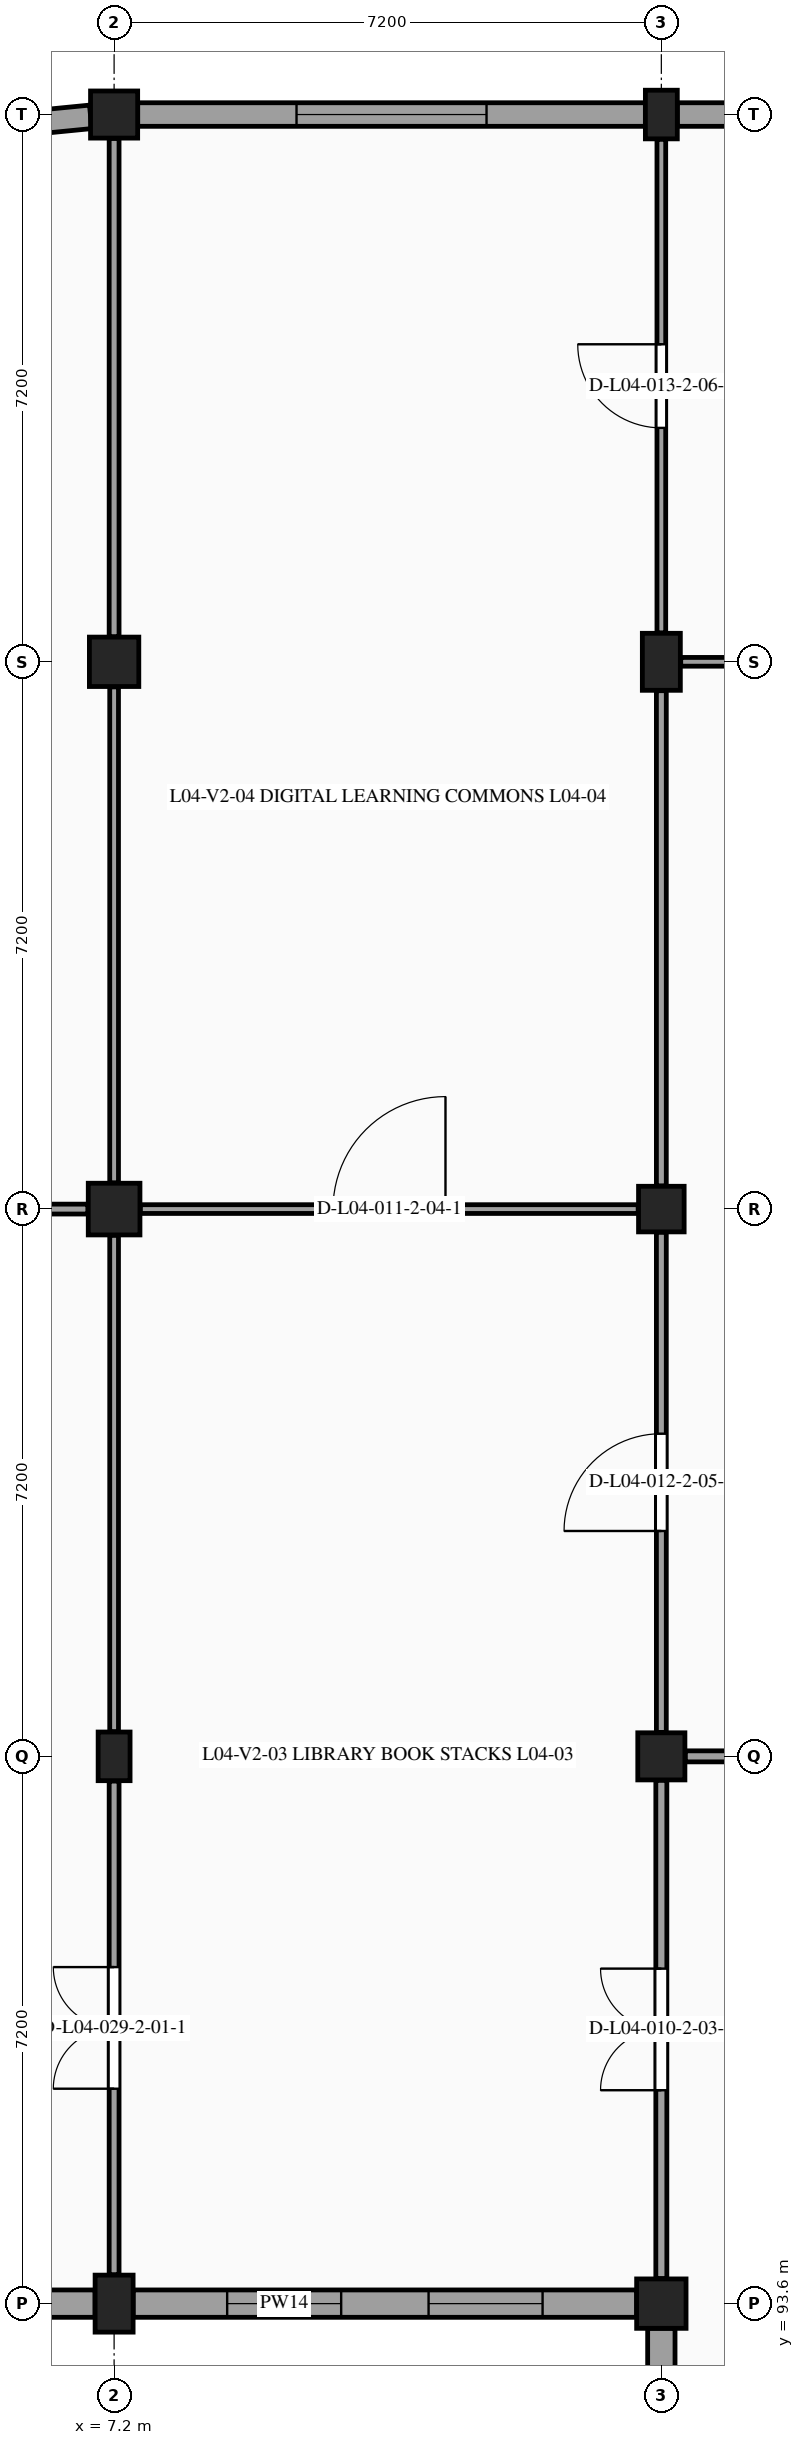
"""IFC4 building model, lengths in metres.
Left out: names, types, materials, properties, quantities, classifications, styles, units other than length and angle.
Written with IfcOpenShell. Run it as: python <this file> out.ifc"""

import sys

from ifc_helpers import new_model, si_unit, direction, frame, frame_2d, origin, origin_2d, place, context, subcontext, project, spatial, rectangle, extrude, element, fill, save


model = new_model("IFC4")
c1 = context("Model", 3, precision=1e-05, world=origin(), true_north=direction((0.0, 1.0)))
c2 = subcontext(c1, "Body", "Model", "MODEL_VIEW")
j1 = project(units=[si_unit("LENGTHUNIT", "METRE"), si_unit("PLANEANGLEUNIT", "RADIAN")], contexts=[c1])
p1 = place(None, origin())
s1 = spatial("IfcSite", under=j1, at=p1, CompositionType="ELEMENT")
p2 = place(p1, origin())
s2 = spatial("IfcBuilding", under=s1, at=p2, CompositionType="ELEMENT")
p3 = place(p2, frame((0.0, 0.0, 18.6)))
s3 = spatial("IfcBuildingStorey", under=s2, at=p3, CompositionType="ELEMENT", Elevation=18.6)
p4 = place(p3, frame((7.2, 93.6, 0.0), z_axis=(0.0, 0.0, 1.0), x_axis=(1.0, 0.0, 0.0)))
e1 = element("IfcColumn", 1, at=p4, inside=s3, PredefinedType="COLUMN", context=c2, shape_type="SweptSolid", body=[
    extrude(rectangle(XDim=0.5, YDim=0.75, at=origin_2d()), origin(), (0.0, 0.0, 1.0), 4.2),
])
p5 = place(p3, frame((7.2, 100.8, 0.0), z_axis=(0.0, 0.0, 1.0), x_axis=(1.0, 0.0, 0.0)))
e2 = element("IfcColumn", 2, at=p5, inside=s3, PredefinedType="PILASTER", context=c2, shape_type="SweptSolid", body=[
    extrude(rectangle(XDim=0.42, YDim=0.64, at=origin_2d()), origin(), (0.0, 0.0, 1.0), 4.2),
])
p6 = place(p3, frame((7.2, 108.0, 0.0), z_axis=(0.0, 0.0, 1.0), x_axis=(1.0, 0.0, 0.0)))
e3 = element("IfcColumn", 3, at=p6, inside=s3, PredefinedType="COLUMN", context=c2, shape_type="SweptSolid", body=[
    extrude(rectangle(XDim=0.68, YDim=0.68, at=origin_2d()), origin(), (0.0, 0.0, 1.0), 4.2),
])
p7 = place(p3, frame((7.2, 115.2, 0.0), z_axis=(0.0, 0.0, 1.0), x_axis=(1.0, 0.0, 0.0)))
e4 = element("IfcColumn", 4, at=p7, inside=s3, PredefinedType="COLUMN", context=c2, shape_type="SweptSolid", body=[
    extrude(rectangle(XDim=0.65, YDim=0.65, at=origin_2d()), origin(), (0.0, 0.0, 1.0), 4.2),
])
p8 = place(p3, frame((7.2, 122.4, 0.0), z_axis=(0.0, 0.0, 1.0), x_axis=(1.0, 0.0, 0.0)))
e5 = element("IfcColumn", 5, at=p8, inside=s3, PredefinedType="COLUMN", context=c2, shape_type="SweptSolid", body=[
    extrude(rectangle(XDim=0.62, YDim=0.62, at=origin_2d()), origin(), (0.0, 0.0, 1.0), 4.2),
])
p9 = place(p3, frame((14.4, 93.6, 0.0), z_axis=(0.0, 0.0, 1.0), x_axis=(1.0, 0.0, 0.0)))
e6 = element("IfcColumn", 6, at=p9, inside=s3, PredefinedType="COLUMN", context=c2, shape_type="SweptSolid", body=[
    extrude(rectangle(XDim=0.65, YDim=0.65, at=origin_2d()), origin(), (0.0, 0.0, 1.0), 4.2),
])
p10 = place(p3, frame((14.4, 100.8, 0.0), z_axis=(0.0, 0.0, 1.0), x_axis=(1.0, 0.0, 0.0)))
e7 = element("IfcColumn", 7, at=p10, inside=s3, PredefinedType="COLUMN", context=c2, shape_type="SweptSolid", body=[
    extrude(rectangle(XDim=0.62, YDim=0.62, at=origin_2d()), origin(), (0.0, 0.0, 1.0), 4.2),
])
p11 = place(p3, frame((14.4, 108.0, 0.0), z_axis=(0.0, 0.0, 1.0), x_axis=(1.0, 0.0, 0.0)))
e8 = element("IfcColumn", 8, at=p11, inside=s3, PredefinedType="COLUMN", context=c2, shape_type="SweptSolid", body=[
    extrude(rectangle(XDim=0.6, YDim=0.6, at=origin_2d()), origin(), (0.0, 0.0, 1.0), 4.2),
])
p12 = place(p3, frame((14.4, 115.2, 0.0), z_axis=(0.0, 0.0, 1.0), x_axis=(1.0, 0.0, 0.0)))
e9 = element("IfcColumn", 9, at=p12, inside=s3, PredefinedType="COLUMN", context=c2, shape_type="SweptSolid", body=[
    extrude(rectangle(XDim=0.5, YDim=0.75, at=origin_2d()), origin(), (0.0, 0.0, 1.0), 4.2),
])
p13 = place(p3, frame((14.4, 122.4, 0.0), z_axis=(0.0, 0.0, 1.0), x_axis=(1.0, 0.0, 0.0)))
e10 = element("IfcColumn", 10, at=p13, inside=s3, PredefinedType="PILASTER", context=c2, shape_type="SweptSolid", body=[
    extrude(rectangle(XDim=0.42, YDim=0.64, at=origin_2d()), origin(), (0.0, 0.0, 1.0), 4.2),
])
p14 = place(p3, frame((14.4, 86.74, 0.0), z_axis=(0.0, 0.0, 1.0), x_axis=(0.0, 1.0, 0.0)))
e11 = element("IfcWall", 11, at=p14, inside=s3, PredefinedType="STANDARD", context=c2, shape_type="SweptSolid", body=[
    extrude(rectangle(XDim=6.535, YDim=0.36, at=frame_2d((3.268, 0.0))), origin(), (0.0, 0.0, 1.0), 3.955),
])
p15 = place(p14, frame((1.51, 0.0, 1.15)))
e12 = element("IfcOpeningElement", 12, at=p15, cuts=e11, PredefinedType="OPENING", context=c2, shape_type="SweptSolid", body=[
    extrude(rectangle(XDim=0.9, YDim=1.3, at=frame_2d((0.45, 0.65))), frame((0.0, 0.19, 0.0), z_axis=(0.0, -1.0, 0.0), x_axis=(1.0, 0.0, 0.0)), (0.0, 0.0, 1.0), 0.38),
])
p16 = place(p14, frame((4.125, 0.0, 1.15)))
e13 = element("IfcOpeningElement", 13, at=p16, cuts=e11, PredefinedType="OPENING", context=c2, shape_type="SweptSolid", body=[
    extrude(rectangle(XDim=0.9, YDim=1.3, at=frame_2d((0.45, 0.65))), frame((0.0, 0.19, 0.0), z_axis=(0.0, -1.0, 0.0), x_axis=(1.0, 0.0, 0.0)), (0.0, 0.0, 1.0), 0.38),
])
p17 = place(p3, frame((14.075, 93.6, 0.0), z_axis=(0.0, 0.0, 1.0), x_axis=(-1.0, 0.0, 0.0)))
e14 = element("IfcWall", 14, at=p17, inside=s3, PredefinedType="STANDARD", context=c2, shape_type="SweptSolid", body=[
    extrude(rectangle(XDim=6.625, YDim=0.36, at=frame_2d((3.312, 0.0))), origin(), (0.0, 0.0, 1.0), 3.2),
])
p18 = place(p17, frame((1.238, 0.0, 1.15)))
e15 = element("IfcOpeningElement", 15, at=p18, cuts=e14, PredefinedType="OPENING", context=c2, shape_type="SweptSolid", body=[
    extrude(rectangle(XDim=1.5, YDim=1.2, at=frame_2d((0.75, 0.6))), frame((0.0, 0.19, 0.0), z_axis=(0.0, -1.0, 0.0), x_axis=(1.0, 0.0, 0.0)), (0.0, 0.0, 1.0), 0.38),
])
p19 = place(p17, frame((3.887, 0.0, 1.15)))
e16 = element("IfcOpeningElement", 16, at=p19, cuts=e14, PredefinedType="OPENING", context=c2, shape_type="SweptSolid", body=[
    extrude(rectangle(XDim=1.5, YDim=1.2, at=frame_2d((0.75, 0.6))), frame((0.0, 0.19, 0.0), z_axis=(0.0, -1.0, 0.0), x_axis=(1.0, 0.0, 0.0)), (0.0, 0.0, 1.0), 0.38),
])
p20 = place(p3, frame((6.95, 93.6, 0.0), z_axis=(0.0, 0.0, 1.0), x_axis=(-1.0, 0.0, 0.0)))
e17 = element("IfcWall", 17, at=p20, inside=s3, PredefinedType="STANDARD", context=c2, shape_type="SweptSolid", body=[
    extrude(rectangle(XDim=6.625, YDim=0.36, at=frame_2d((3.312, 0.0))), origin(), (0.0, 0.0, 1.0), 3.2),
])
p21 = place(p20, frame((1.312, 0.0, 1.15)))
e18 = element("IfcOpeningElement", 18, at=p21, cuts=e17, PredefinedType="OPENING", context=c2, shape_type="SweptSolid", body=[
    extrude(rectangle(XDim=1.35, YDim=1.1, at=frame_2d((0.675, 0.55))), frame((0.0, 0.19, 0.0), z_axis=(0.0, -1.0, 0.0), x_axis=(1.0, 0.0, 0.0)), (0.0, 0.0, 1.0), 0.38),
])
p22 = place(p20, frame((3.962, 0.0, 1.15)))
e19 = element("IfcOpeningElement", 19, at=p22, cuts=e17, PredefinedType="OPENING", context=c2, shape_type="SweptSolid", body=[
    extrude(rectangle(XDim=1.35, YDim=1.1, at=frame_2d((0.675, 0.55))), frame((0.0, 0.19, 0.0), z_axis=(0.0, -1.0, 0.0), x_axis=(1.0, 0.0, 0.0)), (0.0, 0.0, 1.0), 0.38),
])
p23 = place(p3, frame((5.795, 122.262, 0.0), z_axis=(0.0, 0.0, 1.0), x_axis=(0.99518962033, 0.097967441467, 0.0)))
e20 = element("IfcWall", 20, at=p23, inside=s3, PredefinedType="STANDARD", context=c2, shape_type="SweptSolid", body=[
    extrude(rectangle(XDim=1.102, YDim=0.31, at=frame_2d((0.551, 0.0))), origin(), (0.0, 0.0, 1.0), 3.955),
])
p24 = place(p3, frame((7.51, 122.4, 0.0), z_axis=(0.0, 0.0, 1.0), x_axis=(1.0, 0.0, 0.0)))
e21 = element("IfcWall", 21, at=p24, inside=s3, PredefinedType="STANDARD", context=c2, shape_type="SweptSolid", body=[
    extrude(rectangle(XDim=6.68, YDim=0.31, at=frame_2d((3.34, 0.0))), origin(), (0.0, 0.0, 1.0), 3.2),
])
p25 = place(p24, frame((2.09, 0.0, 0.98)))
e22 = element("IfcOpeningElement", 22, at=p25, cuts=e21, PredefinedType="OPENING", context=c2, shape_type="SweptSolid", body=[
    extrude(rectangle(XDim=2.5, YDim=1.35, at=frame_2d((1.25, 0.675))), frame((0.0, 0.165, 0.0), z_axis=(0.0, -1.0, 0.0), x_axis=(1.0, 0.0, 0.0)), (0.0, 0.0, 1.0), 0.33),
])
p26 = place(p3, frame((14.61, 122.4, 0.0), z_axis=(0.0, 0.0, 1.0), x_axis=(1.0, 0.0, 0.0)))
e23 = element("IfcWall", 23, at=p26, inside=s3, PredefinedType="STANDARD", context=c2, shape_type="SweptSolid", body=[
    extrude(rectangle(XDim=6.68, YDim=0.31, at=frame_2d((3.34, 0.0))), origin(), (0.0, 0.0, 1.0), 3.2),
])
p27 = place(p26, frame((2.29, 0.0, 0.98)))
e24 = element("IfcOpeningElement", 24, at=p27, cuts=e23, PredefinedType="OPENING", context=c2, shape_type="SweptSolid", body=[
    extrude(rectangle(XDim=2.1, YDim=1.3, at=frame_2d((1.05, 0.65))), frame((0.0, 0.165, 0.0), z_axis=(0.0, -1.0, 0.0), x_axis=(1.0, 0.0, 0.0)), (0.0, 0.0, 1.0), 0.33),
])
p28 = place(p3, frame((7.2, 93.98, 0.0), z_axis=(0.0, 0.0, 1.0), x_axis=(0.0, 1.0, 0.0)))
e25 = element("IfcWall", 25, at=p28, inside=s3, PredefinedType="PARTITIONING", context=c2, shape_type="SweptSolid", body=[
    extrude(rectangle(XDim=6.495, YDim=0.13, at=frame_2d((3.248, 0.0))), origin(), (0.0, 0.0, 1.0), 3.265),
])
p29 = place(p28, frame((2.448, 0.0, 0.0)))
e26 = element("IfcOpeningElement", 26, at=p29, cuts=e25, PredefinedType="OPENING", context=c2, shape_type="SweptSolid", body=[
    extrude(rectangle(XDim=1.6, YDim=2.2, at=frame_2d((0.8, 1.1))), frame((0.0, 0.075, 0.0), z_axis=(0.0, -1.0, 0.0), x_axis=(1.0, 0.0, 0.0)), (0.0, 0.0, 1.0), 0.15),
])
p30 = place(p3, frame((7.2, 101.125, 0.0), z_axis=(0.0, 0.0, 1.0), x_axis=(0.0, 1.0, 0.0)))
e27 = element("IfcWall", 27, at=p30, inside=s3, PredefinedType="PARTITIONING", context=c2, shape_type="SweptSolid", body=[
    extrude(rectangle(XDim=6.53, YDim=0.115, at=frame_2d((3.265, 0.0))), origin(), (0.0, 0.0, 1.0), 3.26),
])
p31 = place(p3, frame((0.305, 108.0, 0.0), z_axis=(0.0, 0.0, 1.0), x_axis=(1.0, 0.0, 0.0)))
e28 = element("IfcWall", 28, at=p31, inside=s3, PredefinedType="PARTITIONING", context=c2, shape_type="SweptSolid", body=[
    extrude(rectangle(XDim=6.55, YDim=0.13, at=frame_2d((3.275, 0.0))), origin(), (0.0, 0.0, 1.0), 3.235),
])
p32 = place(p31, frame((2.475, 0.0, 0.0)))
e29 = element("IfcOpeningElement", 29, at=p32, cuts=e28, PredefinedType="OPENING", context=c2, shape_type="SweptSolid", body=[
    extrude(rectangle(XDim=1.6, YDim=2.2, at=frame_2d((0.8, 1.1))), frame((0.0, 0.075, 0.0), z_axis=(0.0, -1.0, 0.0), x_axis=(1.0, 0.0, 0.0)), (0.0, 0.0, 1.0), 0.15),
])
p33 = place(p3, frame((7.2, 108.345, 0.0), z_axis=(0.0, 0.0, 1.0), x_axis=(0.0, 1.0, 0.0)))
e30 = element("IfcWall", 30, at=p33, inside=s3, PredefinedType="PARTITIONING", context=c2, shape_type="SweptSolid", body=[
    extrude(rectangle(XDim=6.525, YDim=0.115, at=frame_2d((3.263, 0.0))), origin(), (0.0, 0.0, 1.0), 3.26),
])
p34 = place(p3, frame((7.2, 115.53, 0.0), z_axis=(0.0, 0.0, 1.0), x_axis=(0.0, 1.0, 0.0)))
e31 = element("IfcWall", 31, at=p34, inside=s3, PredefinedType="PARTITIONING", context=c2, shape_type="SweptSolid", body=[
    extrude(rectangle(XDim=6.555, YDim=0.13, at=frame_2d((3.277, 0.0))), origin(), (0.0, 0.0, 1.0), 3.325),
])
p35 = place(p3, frame((14.4, 93.93, 0.0), z_axis=(0.0, 0.0, 1.0), x_axis=(0.0, 1.0, 0.0)))
e32 = element("IfcWall", 32, at=p35, inside=s3, PredefinedType="PARTITIONING", context=c2, shape_type="SweptSolid", body=[
    extrude(rectangle(XDim=6.555, YDim=0.145, at=frame_2d((3.278, 0.0))), origin(), (0.0, 0.0, 1.0), 3.265),
])
p36 = place(p35, frame((2.478, 0.0, 0.0)))
e33 = element("IfcOpeningElement", 33, at=p36, cuts=e32, PredefinedType="OPENING", context=c2, shape_type="SweptSolid", body=[
    extrude(rectangle(XDim=1.6, YDim=2.2, at=frame_2d((0.8, 1.1))), frame((0.0, 0.083, 0.0), z_axis=(0.0, -1.0, 0.0), x_axis=(1.0, 0.0, 0.0)), (0.0, 0.0, 1.0), 0.165),
])
p37 = place(p3, frame((14.4, 101.115, 0.0), z_axis=(0.0, 0.0, 1.0), x_axis=(0.0, 1.0, 0.0)))
e34 = element("IfcWall", 34, at=p37, inside=s3, PredefinedType="PARTITIONING", context=c2, shape_type="SweptSolid", body=[
    extrude(rectangle(XDim=6.58, YDim=0.13, at=frame_2d((3.29, 0.0))), origin(), (0.0, 0.0, 1.0), 3.26),
])
p38 = place(p37, frame((2.65, 0.0, 0.0)))
e35 = element("IfcOpeningElement", 35, at=p38, cuts=e34, PredefinedType="OPENING", context=c2, shape_type="SweptSolid", body=[
    extrude(rectangle(XDim=1.28, YDim=2.24, at=frame_2d((0.64, 1.12))), frame((0.0, 0.075, 0.0), z_axis=(0.0, -1.0, 0.0), x_axis=(1.0, 0.0, 0.0)), (0.0, 0.0, 1.0), 0.15),
])
p39 = place(p3, frame((7.545, 108.0, 0.0), z_axis=(0.0, 0.0, 1.0), x_axis=(1.0, 0.0, 0.0)))
e36 = element("IfcWall", 36, at=p39, inside=s3, PredefinedType="PARTITIONING", context=c2, shape_type="SweptSolid", body=[
    extrude(rectangle(XDim=6.55, YDim=0.115, at=frame_2d((3.275, 0.0))), origin(), (0.0, 0.0, 1.0), 3.255),
])
p40 = place(p39, frame((2.535, 0.0, 0.0)))
e37 = element("IfcOpeningElement", 37, at=p40, cuts=e36, PredefinedType="OPENING", context=c2, shape_type="SweptSolid", body=[
    extrude(rectangle(XDim=1.48, YDim=2.28, at=frame_2d((0.74, 1.14))), frame((0.0, 0.067, 0.0), z_axis=(0.0, -1.0, 0.0), x_axis=(1.0, 0.0, 0.0)), (0.0, 0.0, 1.0), 0.135),
])
p41 = place(p3, frame((14.4, 108.305, 0.0), z_axis=(0.0, 0.0, 1.0), x_axis=(0.0, 1.0, 0.0)))
e38 = element("IfcWall", 38, at=p41, inside=s3, PredefinedType="PARTITIONING", context=c2, shape_type="SweptSolid", body=[
    extrude(rectangle(XDim=6.515, YDim=0.13, at=frame_2d((3.258, 0.0))), origin(), (0.0, 0.0, 1.0), 3.26),
])
p42 = place(p3, frame((14.4, 115.58, 0.0), z_axis=(0.0, 0.0, 1.0), x_axis=(0.0, 1.0, 0.0)))
e39 = element("IfcWall", 39, at=p42, inside=s3, PredefinedType="PARTITIONING", context=c2, shape_type="SweptSolid", body=[
    extrude(rectangle(XDim=6.495, YDim=0.115, at=frame_2d((3.248, 0.0))), origin(), (0.0, 0.0, 1.0), 3.325),
])
p43 = place(p42, frame((2.698, 0.0, 0.0)))
e40 = element("IfcOpeningElement", 40, at=p43, cuts=e39, PredefinedType="OPENING", context=c2, shape_type="SweptSolid", body=[
    extrude(rectangle(XDim=1.1, YDim=2.15, at=frame_2d((0.55, 1.075))), frame((0.0, 0.067, 0.0), z_axis=(0.0, -1.0, 0.0), x_axis=(1.0, 0.0, 0.0)), (0.0, 0.0, 1.0), 0.135),
])
p44 = place(p3, frame((14.715, 100.8, 0.0), z_axis=(0.0, 0.0, 1.0), x_axis=(1.0, 0.0, 0.0)))
e41 = element("IfcWall", 41, at=p44, inside=s3, PredefinedType="PARTITIONING", context=c2, shape_type="SweptSolid", body=[
    extrude(rectangle(XDim=6.67, YDim=0.145, at=frame_2d((3.335, 0.0))), origin(), (0.0, 0.0, 1.0), 3.295),
])
p45 = place(p3, frame((14.655, 115.2, 0.0), z_axis=(0.0, 0.0, 1.0), x_axis=(1.0, 0.0, 0.0)))
e42 = element("IfcWall", 42, at=p45, inside=s3, PredefinedType="PARTITIONING", context=c2, shape_type="SweptSolid", body=[
    extrude(rectangle(XDim=6.615, YDim=0.115, at=frame_2d((3.308, 0.0))), origin(), (0.0, 0.0, 1.0), 3.295),
])
p46 = place(p18, origin())
e43 = element("IfcWindow", 43, at=p46, inside=s3, PartitioningType="SINGLE_PANEL", PredefinedType="WINDOW", context=c2, shape_type="SweptSolid", body=[
    extrude(rectangle(XDim=1.5, YDim=1.2, at=frame_2d((0.75, 0.6))), frame((0.0, -0.08, 0.0), z_axis=(0.0, -1.0, 0.0), x_axis=(1.0, 0.0, 0.0)), (0.0, 0.0, 1.0), 0.06),
])
fill(e15, e43)
p47 = place(p19, origin())
e44 = element("IfcWindow", 44, at=p47, inside=s3, PartitioningType="SINGLE_PANEL", PredefinedType="WINDOW", context=c2, shape_type="SweptSolid", body=[
    extrude(rectangle(XDim=1.5, YDim=1.2, at=frame_2d((0.75, 0.6))), frame((0.0, -0.08, 0.0), z_axis=(0.0, -1.0, 0.0), x_axis=(1.0, 0.0, 0.0)), (0.0, 0.0, 1.0), 0.06),
])
fill(e16, e44)
p48 = place(p25, origin())
e45 = element("IfcWindow", 45, at=p48, inside=s3, PartitioningType="SINGLE_PANEL", PredefinedType="WINDOW", context=c2, shape_type="SweptSolid", body=[
    extrude(rectangle(XDim=2.5, YDim=1.35, at=frame_2d((1.25, 0.675))), frame((0.0, -0.03, 0.0), z_axis=(0.0, -1.0, 0.0), x_axis=(1.0, 0.0, 0.0)), (0.0, 0.0, 1.0), 0.06),
])
fill(e22, e45)
p49 = place(p36, origin())
e46 = element("IfcDoor", 46, at=p49, inside=s3, OperationType="DOUBLE_DOOR_SINGLE_SWING", PredefinedType="DOOR", context=c2, shape_type="SweptSolid", body=[
    extrude(rectangle(XDim=1.6, YDim=2.2, at=frame_2d((0.8, 1.1))), frame((0.0, 0.025, 0.0), z_axis=(0.0, -1.0, 0.0), x_axis=(1.0, 0.0, 0.0)), (0.0, 0.0, 1.0), 0.05),
])
fill(e33, e46)
p50 = place(p40, origin())
e47 = element("IfcDoor", 47, at=p50, inside=s3, OperationType="SINGLE_SWING_RIGHT", PredefinedType="DOOR", context=c2, shape_type="SweptSolid", body=[
    extrude(rectangle(XDim=1.48, YDim=2.28, at=frame_2d((0.74, 1.14))), frame((0.0, 0.025, 0.0), z_axis=(0.0, -1.0, 0.0), x_axis=(1.0, 0.0, 0.0)), (0.0, 0.0, 1.0), 0.05),
])
fill(e37, e47)
p51 = place(p38, origin())
e48 = element("IfcDoor", 48, at=p51, inside=s3, OperationType="SINGLE_SWING_LEFT", PredefinedType="DOOR", context=c2, shape_type="SweptSolid", body=[
    extrude(rectangle(XDim=1.28, YDim=2.24, at=frame_2d((0.64, 1.12))), frame((0.0, 0.025, 0.0), z_axis=(0.0, -1.0, 0.0), x_axis=(1.0, 0.0, 0.0)), (0.0, 0.0, 1.0), 0.05),
])
fill(e35, e48)
p52 = place(p43, origin())
e49 = element("IfcDoor", 49, at=p52, inside=s3, OperationType="SINGLE_SWING_RIGHT", PredefinedType="DOOR", context=c2, shape_type="SweptSolid", body=[
    extrude(rectangle(XDim=1.1, YDim=2.15, at=frame_2d((0.55, 1.075))), frame((0.0, 0.025, 0.0), z_axis=(0.0, -1.0, 0.0), x_axis=(1.0, 0.0, 0.0)), (0.0, 0.0, 1.0), 0.05),
])
fill(e40, e49)
p53 = place(p29, origin())
e50 = element("IfcDoor", 50, at=p53, inside=s3, OperationType="DOUBLE_DOOR_SINGLE_SWING", PredefinedType="DOOR", context=c2, shape_type="SweptSolid", body=[
    extrude(rectangle(XDim=1.6, YDim=2.2, at=frame_2d((0.8, 1.1))), frame((0.0, 0.025, 0.0), z_axis=(0.0, -1.0, 0.0), x_axis=(1.0, 0.0, 0.0)), (0.0, 0.0, 1.0), 0.05),
])
fill(e26, e50)
save(model, sys.argv[1])
